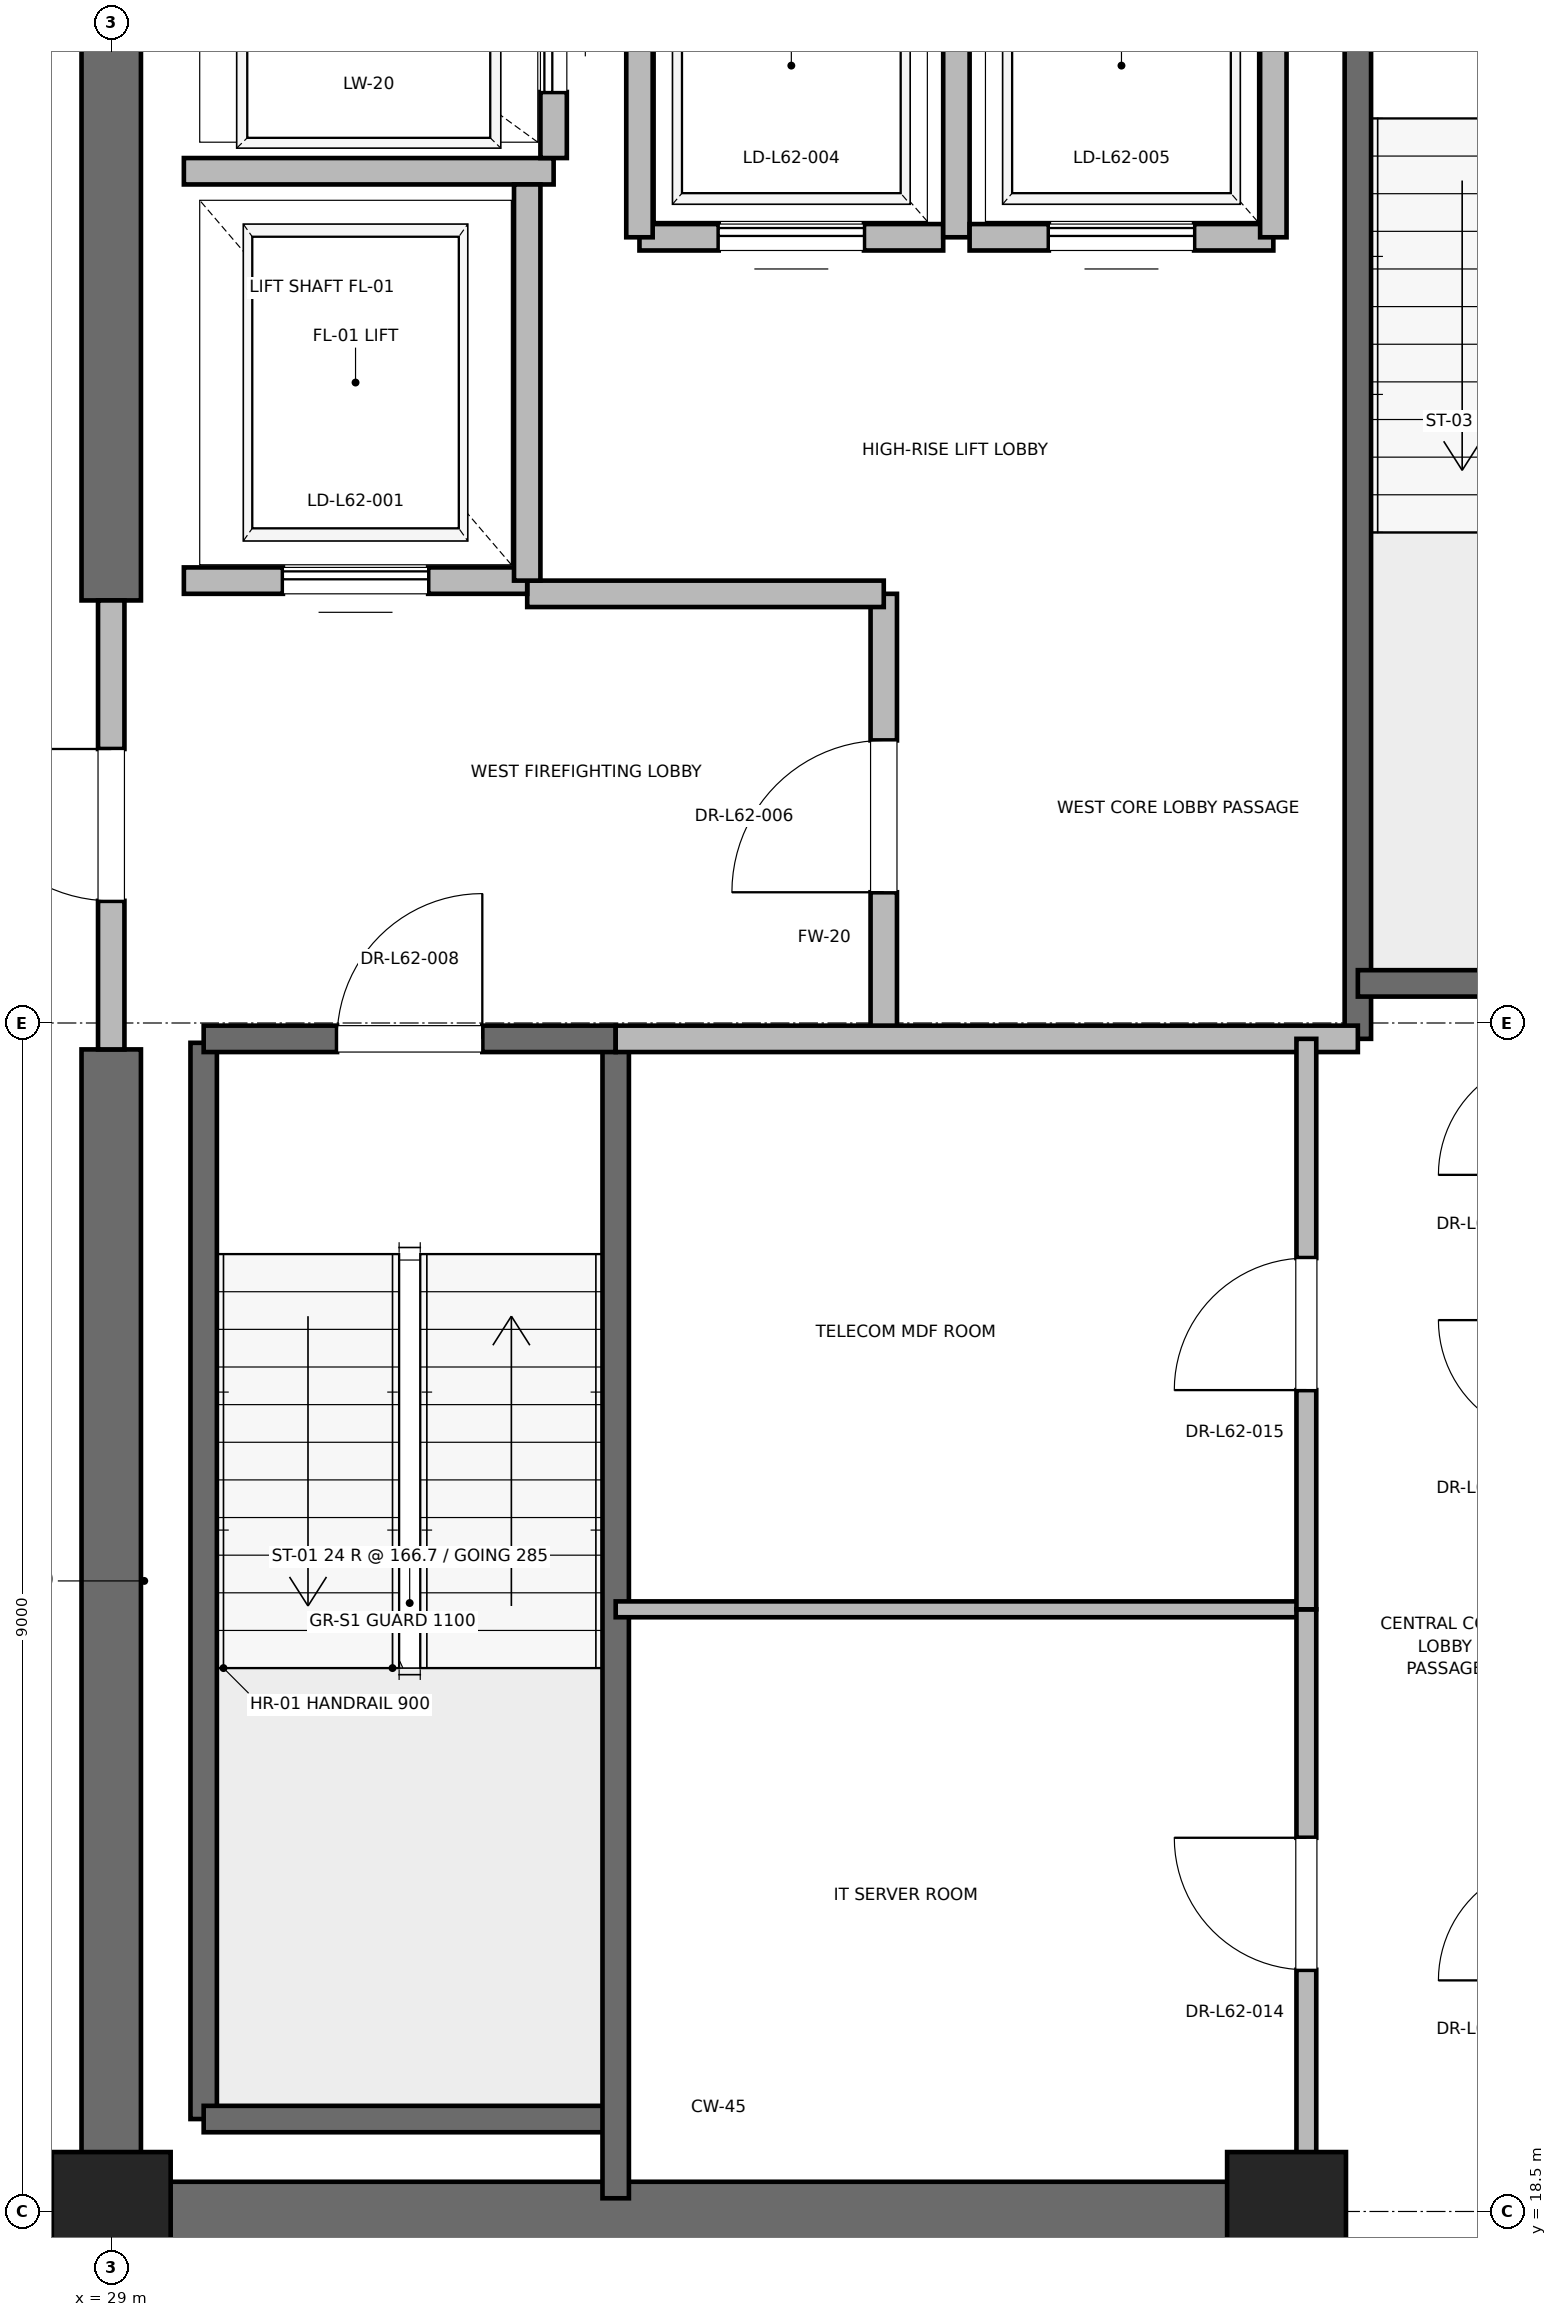
"""IFC4 building model, lengths in metres.
Left out: names, types, materials, properties, quantities, classifications, styles, units other than length and angle.
Written with IfcOpenShell. Run it as: python <this file> out.ifc"""

import sys

from ifc_helpers import new_model, si_unit, direction, frame, frame_2d, origin, origin_2d, place, context, subcontext, project, spatial, rectangle, extrude, element, fill, save


model = new_model("IFC4")
c1 = context("Model", 3, precision=1e-05, world=origin(), true_north=direction((0.0, 1.0)))
c2 = subcontext(c1, "Body", "Model", "MODEL_VIEW")
j1 = project(units=[si_unit("LENGTHUNIT", "METRE"), si_unit("PLANEANGLEUNIT", "RADIAN")], contexts=[c1])
p1 = place(None, origin())
s1 = spatial("IfcSite", under=j1, at=p1, CompositionType="ELEMENT")
p2 = place(p1, origin())
s2 = spatial("IfcBuilding", under=s1, at=p2, CompositionType="ELEMENT")
p3 = place(p2, frame((0.0, 0.0, 267.2)))
s3 = spatial("IfcBuildingStorey", under=s2, at=p3, CompositionType="ELEMENT", Elevation=267.2)
for number, where, z_axis, x_axis in (
    (1, (29.0, 18.5, 0.0), (0.0, 0.0, 1.0), (1.0, 0.0, 0.0)),
    (2, (37.9, 18.5, 0.0), (0.0, 0.0, 1.0), (1.0, 0.0, 0.0)),
):
    element("IfcColumn", number, at=place(p3, frame(where, z_axis=z_axis, x_axis=x_axis)), inside=s3, PredefinedType="PILASTER", context=c2, shape_type="SweptSolid", body=[
        extrude(rectangle(XDim=0.9, YDim=0.9, at=origin_2d()), origin(), (0.0, 0.0, 1.0), 4.0),
    ])
p4 = place(p3, frame((29.0, 18.5, 0.0), z_axis=(0.0, 0.0, 1.0), x_axis=(1.0, 0.0, 0.0)))
e3 = element("IfcWall", 3, at=p4, inside=s3, PredefinedType="SHEAR", context=c2, shape_type="SweptSolid", body=[
    extrude(rectangle(XDim=9.2, YDim=0.45, at=frame_2d((4.6, 0.0))), origin(), (0.0, 0.0, 1.0), 3.785),
])
p5 = place(p3, frame((29.0, 18.5, 0.0), z_axis=(0.0, 0.0, 1.0), x_axis=(0.0, 1.0, 0.0)))
e4 = element("IfcWall", 4, at=p5, inside=s3, PredefinedType="SHEAR", context=c2, shape_type="SweptSolid", body=[
    extrude(rectangle(XDim=8.8, YDim=0.45, at=frame_2d((4.4, 0.0))), origin(), (0.0, 0.0, 1.0), 3.785),
])
p6 = place(p3, frame((29.0, 30.7, 0.0), z_axis=(0.0, 0.0, 1.0), x_axis=(0.0, 1.0, 0.0)))
e5 = element("IfcWall", 5, at=p6, inside=s3, PredefinedType="SHEAR", context=c2, shape_type="SweptSolid", body=[
    extrude(rectangle(XDim=5.8, YDim=0.45, at=frame_2d((2.9, 0.0))), origin(), (0.0, 0.0, 1.0), 3.785),
])
p7 = place(p3, frame((29.7, 19.2, 0.0), z_axis=(0.0, 0.0, 1.0), x_axis=(0.0, 1.0, 0.0)))
e6 = element("IfcWall", 6, at=p7, inside=s3, PredefinedType="SOLIDWALL", context=c2, shape_type="SweptSolid", body=[
    extrude(rectangle(XDim=8.15, YDim=0.2, at=frame_2d((4.075, 0.0))), origin(), (0.0, 0.0, 1.0), 3.785),
])
p8 = place(p3, frame((29.7, 19.2, 0.0), z_axis=(0.0, 0.0, 1.0), x_axis=(1.0, 0.0, 0.0)))
e7 = element("IfcWall", 7, at=p8, inside=s3, PredefinedType="SOLIDWALL", context=c2, shape_type="SweptSolid", body=[
    extrude(rectangle(XDim=3.12, YDim=0.2, at=frame_2d((1.56, 0.0))), origin(), (0.0, 0.0, 1.0), 3.785),
])
p9 = place(p3, frame((32.82, 18.6, 0.0), z_axis=(0.0, 0.0, 1.0), x_axis=(0.0, 1.0, 0.0)))
e8 = element("IfcWall", 8, at=p9, inside=s3, PredefinedType="SOLIDWALL", context=c2, shape_type="SweptSolid", body=[
    extrude(rectangle(XDim=8.78, YDim=0.2, at=frame_2d((4.39, 0.0))), origin(), (0.0, 0.0, 1.0), 3.785),
])
p10 = place(p3, frame((29.7, 27.38, 0.0), z_axis=(0.0, 0.0, 1.0), x_axis=(1.0, 0.0, 0.0)))
e9 = element("IfcWall", 9, at=p10, inside=s3, PredefinedType="SOLIDWALL", context=c2, shape_type="SweptSolid", body=[
    extrude(rectangle(XDim=3.12, YDim=0.2, at=frame_2d((1.56, 0.0))), origin(), (0.0, 0.0, 1.0), 3.785),
])
p11 = place(p10, frame((1.01, 0.0, 0.0)))
e10 = element("IfcOpeningElement", 10, at=p11, cuts=e9, PredefinedType="OPENING", context=c2, shape_type="SweptSolid", body=[
    extrude(rectangle(XDim=1.1, YDim=2.15, at=frame_2d((0.55, 1.075))), frame((0.0, 0.1, 0.0), z_axis=(0.0, -1.0, 0.0), x_axis=(1.0, 0.0, 0.0)), (0.0, 0.0, 1.0), 0.2),
])
p12 = place(p3, frame((38.44, 27.38, 0.0), z_axis=(0.0, 0.0, 1.0), x_axis=(0.0, 1.0, 0.0)))
e11 = element("IfcWall", 11, at=p12, inside=s3, PredefinedType="SOLIDWALL", context=c2, shape_type="SweptSolid", body=[
    extrude(rectangle(XDim=8.87, YDim=0.2, at=frame_2d((4.435, 0.0))), origin(), (0.0, 0.0, 1.0), 3.785),
])
p13 = place(p3, frame((38.44, 27.8, 0.0), z_axis=(0.0, 0.0, 1.0), x_axis=(1.0, 0.0, 0.0)))
e12 = element("IfcWall", 12, at=p13, inside=s3, PredefinedType="SOLIDWALL", context=c2, shape_type="SweptSolid", body=[
    extrude(rectangle(XDim=3.32, YDim=0.2, at=frame_2d((1.66, 0.0))), origin(), (0.0, 0.0, 1.0), 3.785),
])
p14 = place(p3, frame((34.85, 27.38, 0.0), z_axis=(0.0, 0.0, 1.0), x_axis=(0.0, 1.0, 0.0)))
e13 = element("IfcWall", 13, at=p14, inside=s3, PredefinedType="PARTITIONING", context=c2, shape_type="SweptSolid", body=[
    extrude(rectangle(XDim=3.37, YDim=0.2, at=frame_2d((1.685, 0.0))), origin(), (0.0, 0.0, 1.0), 3.785),
])
p15 = place(p14, frame((1.11, 0.0, 0.0)))
e14 = element("IfcOpeningElement", 14, at=p15, cuts=e13, PredefinedType="OPENING", context=c2, shape_type="SweptSolid", body=[
    extrude(rectangle(XDim=1.15, YDim=2.2, at=frame_2d((0.575, 1.1))), frame((0.0, 0.1, 0.0), z_axis=(0.0, -1.0, 0.0), x_axis=(1.0, 0.0, 0.0)), (0.0, 0.0, 1.0), 0.2),
])
p16 = place(p3, frame((29.0, 27.3, 0.0), z_axis=(0.0, 0.0, 1.0), x_axis=(0.0, 1.0, 0.0)))
e15 = element("IfcWall", 15, at=p16, inside=s3, PredefinedType="PARTITIONING", context=c2, shape_type="SweptSolid", body=[
    extrude(rectangle(XDim=3.4, YDim=0.2, at=frame_2d((1.7, 0.0))), origin(), (0.0, 0.0, 1.0), 2.865),
])
p17 = place(p16, frame((1.125, 0.0, 0.0)))
e16 = element("IfcOpeningElement", 16, at=p17, cuts=e15, PredefinedType="OPENING", context=c2, shape_type="SweptSolid", body=[
    extrude(rectangle(XDim=1.15, YDim=2.2, at=frame_2d((0.575, 1.1))), frame((0.0, 0.1, 0.0), z_axis=(0.0, -1.0, 0.0), x_axis=(1.0, 0.0, 0.0)), (0.0, 0.0, 1.0), 0.2),
])
p18 = place(p3, frame((32.82, 27.38, 0.0), z_axis=(0.0, 0.0, 1.0), x_axis=(1.0, 0.0, 0.0)))
e17 = element("IfcWall", 17, at=p18, inside=s3, PredefinedType="PARTITIONING", context=c2, shape_type="SweptSolid", body=[
    extrude(rectangle(XDim=5.62, YDim=0.2, at=frame_2d((2.81, 0.0))), origin(), (0.0, 0.0, 1.0), 3.785),
])
p19 = place(p3, frame((32.15, 30.75, 0.0), z_axis=(0.0, 0.0, 1.0), x_axis=(1.0, 0.0, 0.0)))
e18 = element("IfcWall", 18, at=p19, inside=s3, PredefinedType="PARTITIONING", context=c2, shape_type="SweptSolid", body=[
    extrude(rectangle(XDim=2.7, YDim=0.2, at=frame_2d((1.35, 0.0))), origin(), (0.0, 0.0, 1.0), 3.785),
])
p20 = place(p3, frame((29.55, 30.85, 0.0), z_axis=(0.0, 0.0, 1.0), x_axis=(1.0, 0.0, 0.0)))
e19 = element("IfcWall", 19, at=p20, inside=s3, PredefinedType="SOLIDWALL", context=c2, shape_type="SweptSolid", body=[
    extrude(rectangle(XDim=2.6, YDim=0.2, at=frame_2d((1.3, 0.0))), origin(), (0.0, 0.0, 1.0), 2.865),
])
p21 = place(p20, frame((0.75, 0.0, 0.0)))
e20 = element("IfcOpeningElement", 20, at=p21, cuts=e19, PredefinedType="OPENING", context=c2, shape_type="SweptSolid", body=[
    extrude(rectangle(XDim=1.1, YDim=2.2, at=frame_2d((0.55, 1.1))), frame((0.0, 0.1, 0.0), z_axis=(0.0, -1.0, 0.0), x_axis=(1.0, 0.0, 0.0)), (0.0, 0.0, 1.0), 0.2),
])
p22 = place(p3, frame((29.55, 33.95, 0.0), z_axis=(0.0, 0.0, 1.0), x_axis=(1.0, 0.0, 0.0)))
e21 = element("IfcWall", 21, at=p22, inside=s3, PredefinedType="SOLIDWALL", context=c2, shape_type="SweptSolid", body=[
    extrude(rectangle(XDim=2.8, YDim=0.2, at=frame_2d((1.4, 0.0))), origin(), (0.0, 0.0, 1.0), 3.785),
])
p23 = place(p3, frame((32.15, 30.85, 0.0), z_axis=(0.0, 0.0, 1.0), x_axis=(0.0, 1.0, 0.0)))
e22 = element("IfcWall", 22, at=p23, inside=s3, PredefinedType="SOLIDWALL", context=c2, shape_type="SweptSolid", body=[
    extrude(rectangle(XDim=3.0, YDim=0.2, at=frame_2d((1.5, 0.0))), origin(), (0.0, 0.0, 1.0), 3.785),
])
p24 = place(p3, frame((32.35, 34.05, 0.0), z_axis=(0.0, 0.0, 1.0), x_axis=(0.0, 1.0, 0.0)))
e23 = element("IfcWall", 23, at=p24, inside=s3, PredefinedType="SOLIDWALL", context=c2, shape_type="SweptSolid", body=[
    extrude(rectangle(XDim=2.1, YDim=0.2, at=frame_2d((1.05, 0.0))), origin(), (0.0, 0.0, 1.0), 3.785),
])
p25 = place(p24, frame((0.5, 0.0, 0.0)))
e24 = element("IfcOpeningElement", 24, at=p25, cuts=e23, PredefinedType="OPENING", context=c2, shape_type="SweptSolid", body=[
    extrude(rectangle(XDim=1.1, YDim=2.2, at=frame_2d((0.55, 1.1))), frame((0.0, 0.1, 0.0), z_axis=(0.0, -1.0, 0.0), x_axis=(1.0, 0.0, 0.0)), (0.0, 0.0, 1.0), 0.2),
])
p26 = place(p3, frame((33.0, 33.45, 0.0), z_axis=(0.0, 0.0, 1.0), x_axis=(1.0, 0.0, 0.0)))
e25 = element("IfcWall", 25, at=p26, inside=s3, PredefinedType="SOLIDWALL", context=c2, shape_type="SweptSolid", body=[
    extrude(rectangle(XDim=2.3, YDim=0.2, at=frame_2d((1.15, 0.0))), origin(), (0.0, 0.0, 1.0), 3.785),
])
p27 = place(p26, frame((0.6, 0.0, 0.0)))
e26 = element("IfcOpeningElement", 26, at=p27, cuts=e25, PredefinedType="OPENING", context=c2, shape_type="SweptSolid", body=[
    extrude(rectangle(XDim=1.1, YDim=2.2, at=frame_2d((0.55, 1.1))), frame((0.0, 0.1, 0.0), z_axis=(0.0, -1.0, 0.0), x_axis=(1.0, 0.0, 0.0)), (0.0, 0.0, 1.0), 0.2),
])
p28 = place(p3, frame((33.0, 36.05, 0.0), z_axis=(0.0, 0.0, 1.0), x_axis=(0.0, -1.0, 0.0)))
e27 = element("IfcWall", 27, at=p28, inside=s3, PredefinedType="SOLIDWALL", context=c2, shape_type="SweptSolid", body=[
    extrude(rectangle(XDim=2.6, YDim=0.2, at=frame_2d((1.3, 0.0))), origin(), (0.0, 0.0, 1.0), 3.785),
])
p29 = place(p3, frame((35.4, 33.45, 0.0), z_axis=(0.0, 0.0, 1.0), x_axis=(0.0, 1.0, 0.0)))
e28 = element("IfcWall", 28, at=p29, inside=s3, PredefinedType="SOLIDWALL", context=c2, shape_type="SweptSolid", body=[
    extrude(rectangle(XDim=2.6, YDim=0.2, at=frame_2d((1.3, 0.0))), origin(), (0.0, 0.0, 1.0), 2.865),
])
p30 = place(p3, frame((35.5, 33.45, 0.0), z_axis=(0.0, 0.0, 1.0), x_axis=(1.0, 0.0, 0.0)))
e29 = element("IfcWall", 29, at=p30, inside=s3, PredefinedType="SOLIDWALL", context=c2, shape_type="SweptSolid", body=[
    extrude(rectangle(XDim=2.3, YDim=0.2, at=frame_2d((1.15, 0.0))), origin(), (0.0, 0.0, 1.0), 3.785),
])
p31 = place(p30, frame((0.6, 0.0, 0.0)))
e30 = element("IfcOpeningElement", 30, at=p31, cuts=e29, PredefinedType="OPENING", context=c2, shape_type="SweptSolid", body=[
    extrude(rectangle(XDim=1.1, YDim=2.2, at=frame_2d((0.55, 1.1))), frame((0.0, 0.1, 0.0), z_axis=(0.0, -1.0, 0.0), x_axis=(1.0, 0.0, 0.0)), (0.0, 0.0, 1.0), 0.2),
])
p32 = place(p3, frame((37.8, 33.45, 0.0), z_axis=(0.0, 0.0, 1.0), x_axis=(0.0, 1.0, 0.0)))
e31 = element("IfcWall", 31, at=p32, inside=s3, PredefinedType="SOLIDWALL", context=c2, shape_type="SweptSolid", body=[
    extrude(rectangle(XDim=2.6, YDim=0.2, at=frame_2d((1.3, 0.0))), origin(), (0.0, 0.0, 1.0), 2.865),
])
p33 = place(p3, frame((32.82, 23.06, 0.0), z_axis=(0.0, 0.0, 1.0), x_axis=(1.0, 0.0, 0.0)))
e32 = element("IfcWall", 32, at=p33, inside=s3, PredefinedType="PARTITIONING", context=c2, shape_type="SweptSolid", body=[
    extrude(rectangle(XDim=5.23, YDim=0.12, at=frame_2d((2.615, 0.0))), origin(), (0.0, 0.0, 1.0), 2.85),
])
p34 = place(p3, frame((38.05, 18.6, 0.0), z_axis=(0.0, 0.0, 1.0), x_axis=(0.0, 1.0, 0.0)))
e33 = element("IfcWall", 33, at=p34, inside=s3, PredefinedType="PARTITIONING", context=c2, shape_type="SweptSolid", body=[
    extrude(rectangle(XDim=4.46, YDim=0.15, at=frame_2d((2.23, 0.0))), origin(), (0.0, 0.0, 1.0), 2.85),
])
p35 = place(p34, frame((1.73, 0.0, 0.0)))
e34 = element("IfcOpeningElement", 34, at=p35, cuts=e33, PredefinedType="OPENING", context=c2, shape_type="SweptSolid", body=[
    extrude(rectangle(XDim=1.0, YDim=2.15, at=frame_2d((0.5, 1.075))), frame((0.0, 0.075, 0.0), z_axis=(0.0, -1.0, 0.0), x_axis=(1.0, 0.0, 0.0)), (0.0, 0.0, 1.0), 0.15),
])
p36 = place(p3, frame((38.05, 23.06, 0.0), z_axis=(0.0, 0.0, 1.0), x_axis=(0.0, 1.0, 0.0)))
e35 = element("IfcWall", 35, at=p36, inside=s3, PredefinedType="PARTITIONING", context=c2, shape_type="SweptSolid", body=[
    extrude(rectangle(XDim=4.32, YDim=0.15, at=frame_2d((2.16, 0.0))), origin(), (0.0, 0.0, 1.0), 2.85),
])
p37 = place(p36, frame((1.66, 0.0, 0.0)))
e36 = element("IfcOpeningElement", 36, at=p37, cuts=e35, PredefinedType="OPENING", context=c2, shape_type="SweptSolid", body=[
    extrude(rectangle(XDim=1.0, YDim=2.15, at=frame_2d((0.5, 1.075))), frame((0.0, 0.075, 0.0), z_axis=(0.0, -1.0, 0.0), x_axis=(1.0, 0.0, 0.0)), (0.0, 0.0, 1.0), 0.15),
])
p38 = place(p11, origin())
e37 = element("IfcDoor", 37, at=p38, inside=s3, OperationType="SINGLE_SWING_RIGHT", PredefinedType="DOOR", context=c2, shape_type="SweptSolid", body=[
    extrude(rectangle(XDim=1.1, YDim=2.15, at=frame_2d((0.55, 1.075))), frame((0.0, 0.025, 0.0), z_axis=(0.0, -1.0, 0.0), x_axis=(1.0, 0.0, 0.0)), (0.0, 0.0, 1.0), 0.05),
])
fill(e10, e37)
p39 = place(p15, origin())
e38 = element("IfcDoor", 38, at=p39, inside=s3, OperationType="SINGLE_SWING_LEFT", PredefinedType="DOOR", context=c2, shape_type="SweptSolid", body=[
    extrude(rectangle(XDim=1.15, YDim=2.2, at=frame_2d((0.575, 1.1))), frame((0.0, 0.025, 0.0), z_axis=(0.0, -1.0, 0.0), x_axis=(1.0, 0.0, 0.0)), (0.0, 0.0, 1.0), 0.05),
])
fill(e14, e38)
p40 = place(p17, origin())
e39 = element("IfcDoor", 39, at=p40, inside=s3, OperationType="SINGLE_SWING_RIGHT", PredefinedType="DOOR", context=c2, shape_type="SweptSolid", body=[
    extrude(rectangle(XDim=1.15, YDim=2.2, at=frame_2d((0.575, 1.1))), frame((0.0, 0.025, 0.0), z_axis=(0.0, -1.0, 0.0), x_axis=(1.0, 0.0, 0.0)), (0.0, 0.0, 1.0), 0.05),
])
fill(e16, e39)
p41 = place(p21, origin())
e40 = element("IfcDoor", 40, at=p41, inside=s3, OperationType="SLIDING_TO_RIGHT", PredefinedType="DOOR", context=c2, shape_type="SweptSolid", body=[
    extrude(rectangle(XDim=1.1, YDim=2.2, at=frame_2d((0.55, 1.1))), frame((0.0, 0.025, 0.0), z_axis=(0.0, -1.0, 0.0), x_axis=(1.0, 0.0, 0.0)), (0.0, 0.0, 1.0), 0.05),
])
fill(e20, e40)
p42 = place(p25, origin())
e41 = element("IfcDoor", 41, at=p42, inside=s3, OperationType="SLIDING_TO_RIGHT", PredefinedType="DOOR", context=c2, shape_type="SweptSolid", body=[
    extrude(rectangle(XDim=1.1, YDim=2.2, at=frame_2d((0.55, 1.1))), frame((0.0, 0.025, 0.0), z_axis=(0.0, -1.0, 0.0), x_axis=(1.0, 0.0, 0.0)), (0.0, 0.0, 1.0), 0.05),
])
fill(e24, e41)
p43 = place(p27, origin())
e42 = element("IfcDoor", 42, at=p43, inside=s3, OperationType="SLIDING_TO_RIGHT", PredefinedType="DOOR", context=c2, shape_type="SweptSolid", body=[
    extrude(rectangle(XDim=1.1, YDim=2.2, at=frame_2d((0.55, 1.1))), frame((0.0, 0.025, 0.0), z_axis=(0.0, -1.0, 0.0), x_axis=(1.0, 0.0, 0.0)), (0.0, 0.0, 1.0), 0.05),
])
fill(e26, e42)
p44 = place(p31, origin())
e43 = element("IfcDoor", 43, at=p44, inside=s3, OperationType="SLIDING_TO_RIGHT", PredefinedType="DOOR", context=c2, shape_type="SweptSolid", body=[
    extrude(rectangle(XDim=1.1, YDim=2.2, at=frame_2d((0.55, 1.1))), frame((0.0, 0.025, 0.0), z_axis=(0.0, -1.0, 0.0), x_axis=(1.0, 0.0, 0.0)), (0.0, 0.0, 1.0), 0.05),
])
fill(e30, e43)
p45 = place(p35, origin())
e44 = element("IfcDoor", 44, at=p45, inside=s3, OperationType="SINGLE_SWING_RIGHT", PredefinedType="DOOR", context=c2, shape_type="SweptSolid", body=[
    extrude(rectangle(XDim=1.0, YDim=2.15, at=frame_2d((0.5, 1.075))), frame((0.0, 0.025, 0.0), z_axis=(0.0, -1.0, 0.0), x_axis=(1.0, 0.0, 0.0)), (0.0, 0.0, 1.0), 0.05),
])
fill(e34, e44)
p46 = place(p37, origin())
e45 = element("IfcDoor", 45, at=p46, inside=s3, OperationType="SINGLE_SWING_LEFT", PredefinedType="DOOR", context=c2, shape_type="SweptSolid", body=[
    extrude(rectangle(XDim=1.0, YDim=2.15, at=frame_2d((0.5, 1.075))), frame((0.0, 0.025, 0.0), z_axis=(0.0, -1.0, 0.0), x_axis=(1.0, 0.0, 0.0)), (0.0, 0.0, 1.0), 0.05),
])
fill(e36, e45)
save(model, sys.argv[1])
